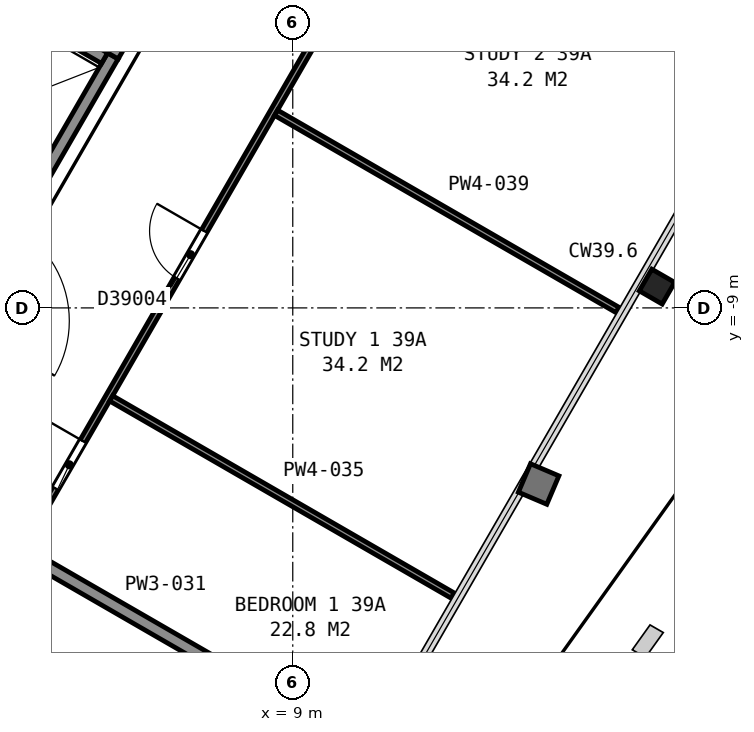
"""IFC4 building model, lengths in metres.
Left out: names, types, materials, properties, quantities, classifications, styles, units other than length and angle.
Written with IfcOpenShell. Run it as: python <this file> out.ifc"""

import sys

from ifc_helpers import new_model, si_unit, direction, frame, frame_2d, origin, origin_2d, place, context, subcontext, project, spatial, rectangle, i_section, extrude, element, fill, save


model = new_model("IFC4")
c1 = context("Model", 3, precision=1e-05, world=origin(), true_north=direction((0.0, 1.0)))
c2 = subcontext(c1, "Body", "Model", "MODEL_VIEW")
j1 = project(units=[si_unit("LENGTHUNIT", "METRE"), si_unit("PLANEANGLEUNIT", "RADIAN")], contexts=[c1])
p1 = place(None, origin())
s1 = spatial("IfcSite", under=j1, at=p1, CompositionType="ELEMENT")
p2 = place(p1, origin())
s2 = spatial("IfcBuilding", under=s1, at=p2, CompositionType="ELEMENT")
p3 = place(p2, frame((0.0, 0.0, 159.9)))
s3 = spatial("IfcBuildingStorey", under=s2, at=p3, CompositionType="ELEMENT", Elevation=159.9)
p4 = place(p3, frame((14.99, -8.65, 0.035), z_axis=(0.0, 0.0, 1.0), x_axis=(-0.5, -0.866025403784, 0.0)))
e1 = element("IfcColumn", 1, at=p4, inside=s3, PredefinedType="COLUMN", context=c2, shape_type="SweptSolid", body=[
    extrude(i_section(OverallWidth=0.411, OverallDepth=0.434, WebThickness=0.036, FlangeThickness=0.057, FilletRadius=0.015, at=origin_2d()), origin(), (0.0, 0.0, 1.0), 3.665),
])
p5 = place(p3, frame((4.766, -7.065, 0.0), z_axis=(0.0, 0.0, 1.0), x_axis=(0.499948979701, 0.866054858364, 0.0)))
e2 = element("IfcWall", 2, at=p5, inside=s3, PredefinedType="PARTITIONING", context=c2, shape_type="SweptSolid", body=[
    extrude(rectangle(XDim=2.55, YDim=0.2, at=frame_2d((1.275, 0.0))), origin(), (0.0, 0.0, 1.0), 3.7),
])
p6 = place(p3, frame((5.905, -4.893, 0.0), z_axis=(0.0, 0.0, 1.0), x_axis=(-0.866002029911, 0.500040482552, 0.0)))
e3 = element("IfcWall", 3, at=p6, inside=s3, PredefinedType="PARTITIONING", context=c2, shape_type="SweptSolid", body=[
    extrude(rectangle(XDim=1.75, YDim=0.2, at=frame_2d((0.875, 0.0))), origin(), (0.0, 0.0, 1.0), 3.7),
])
p7 = place(p3, frame((6.042, -4.855, 0.0), z_axis=(0.0, 0.0, 1.0), x_axis=(0.500252727967, 0.865879442048, 0.0)))
e4 = element("IfcWall", 4, at=p7, inside=s3, PredefinedType="PARTITIONING", context=c2, shape_type="SweptSolid", body=[
    extrude(rectangle(XDim=2.617, YDim=0.2, at=frame_2d((1.309, 0.0))), origin(), (0.0, 0.0, 1.0), 3.45),
])
p8 = place(p3, frame((4.85, -13.191, 0.0), z_axis=(0.0, 0.0, 1.0), x_axis=(0.866109679077, -0.499854002494, 0.0)))
e5 = element("IfcWall", 5, at=p8, inside=s3, PredefinedType="PARTITIONING", context=c2, shape_type="SweptSolid", body=[
    extrude(rectangle(XDim=3.16, YDim=0.2, at=frame_2d((1.58, 0.0))), origin(), (0.0, 0.0, 1.0), 2.713),
])
p9 = place(p3, frame((13.342, 2.306, 0.0), z_axis=(0.0, 0.0, 1.0), x_axis=(-0.49997635812, -0.866039053, 0.0)))
e6 = element("IfcWall", 6, at=p9, inside=s3, PredefinedType="PARTITIONING", context=c2, shape_type="SweptSolid", body=[
    extrude(rectangle(XDim=17.285, YDim=0.1, at=frame_2d((8.643, 0.0))), origin(), (0.0, 0.0, 1.0), 2.713),
])
p10 = place(p9, frame((15.585, 0.0, 0.0)))
e7 = element("IfcOpeningElement", 7, at=p10, cuts=e6, PredefinedType="OPENING", context=c2, shape_type="SweptSolid", body=[
    extrude(rectangle(XDim=0.9, YDim=2.1, at=frame_2d((0.45, 1.05))), frame((0.0, 0.06, 0.0), z_axis=(0.0, -1.0, 0.0), x_axis=(1.0, 0.0, 0.0)), (0.0, 0.0, 1.0), 0.12),
])
p11 = place(p9, frame((11.595, 0.0, 0.0)))
e8 = element("IfcOpeningElement", 8, at=p11, cuts=e6, PredefinedType="OPENING", context=c2, shape_type="SweptSolid", body=[
    extrude(rectangle(XDim=0.9, YDim=2.1, at=frame_2d((0.45, 1.05))), frame((0.0, 0.06, 0.0), z_axis=(0.0, -1.0, 0.0), x_axis=(1.0, 0.0, 0.0)), (0.0, 0.0, 1.0), 0.12),
])
p12 = place(p9, frame((6.171, 0.0, 0.0)))
e9 = element("IfcOpeningElement", 9, at=p12, cuts=e6, PredefinedType="OPENING", context=c2, shape_type="SweptSolid", body=[
    extrude(rectangle(XDim=0.9, YDim=2.1, at=frame_2d((0.45, 1.05))), frame((0.0, 0.06, 0.0), z_axis=(0.0, -1.0, 0.0), x_axis=(1.0, 0.0, 0.0)), (0.0, 0.0, 1.0), 0.12),
])
p13 = place(p3, frame((6.013, -10.488, 0.0), z_axis=(0.0, 0.0, 1.0), x_axis=(0.86599118531, -0.500059263454, 0.0)))
e10 = element("IfcWall", 10, at=p13, inside=s3, PredefinedType="PARTITIONING", context=c2, shape_type="SweptSolid", body=[
    extrude(rectangle(XDim=6.484, YDim=0.1, at=frame_2d((3.242, 0.0))), origin(), (0.0, 0.0, 1.0), 2.713),
])
p14 = place(p3, frame((8.725, -5.791, 0.0), z_axis=(0.0, 0.0, 1.0), x_axis=(0.865998075994, -0.500047330135, 0.0)))
e11 = element("IfcWall", 11, at=p14, inside=s3, PredefinedType="PARTITIONING", context=c2, shape_type="SweptSolid", body=[
    extrude(rectangle(XDim=6.483, YDim=0.1, at=frame_2d((3.242, 0.0))), origin(), (0.0, 0.0, 1.0), 2.713),
])
p15 = place(p10, origin())
e12 = element("IfcDoor", 12, at=p15, inside=s3, OperationType="SINGLE_SWING_LEFT", PredefinedType="DOOR", context=c2, shape_type="SweptSolid", body=[
    extrude(rectangle(XDim=0.9, YDim=2.1, at=frame_2d((0.45, 1.05))), frame((0.0, 0.025, 0.0), z_axis=(0.0, -1.0, 0.0), x_axis=(1.0, 0.0, 0.0)), (0.0, 0.0, 1.0), 0.05),
])
fill(e7, e12)
p16 = place(p11, origin())
e13 = element("IfcDoor", 13, at=p16, inside=s3, OperationType="SINGLE_SWING_LEFT", PredefinedType="DOOR", context=c2, shape_type="SweptSolid", body=[
    extrude(rectangle(XDim=0.9, YDim=2.1, at=frame_2d((0.45, 1.05))), frame((0.0, 0.025, 0.0), z_axis=(0.0, -1.0, 0.0), x_axis=(1.0, 0.0, 0.0)), (0.0, 0.0, 1.0), 0.05),
])
fill(e8, e13)
save(model, sys.argv[1])
